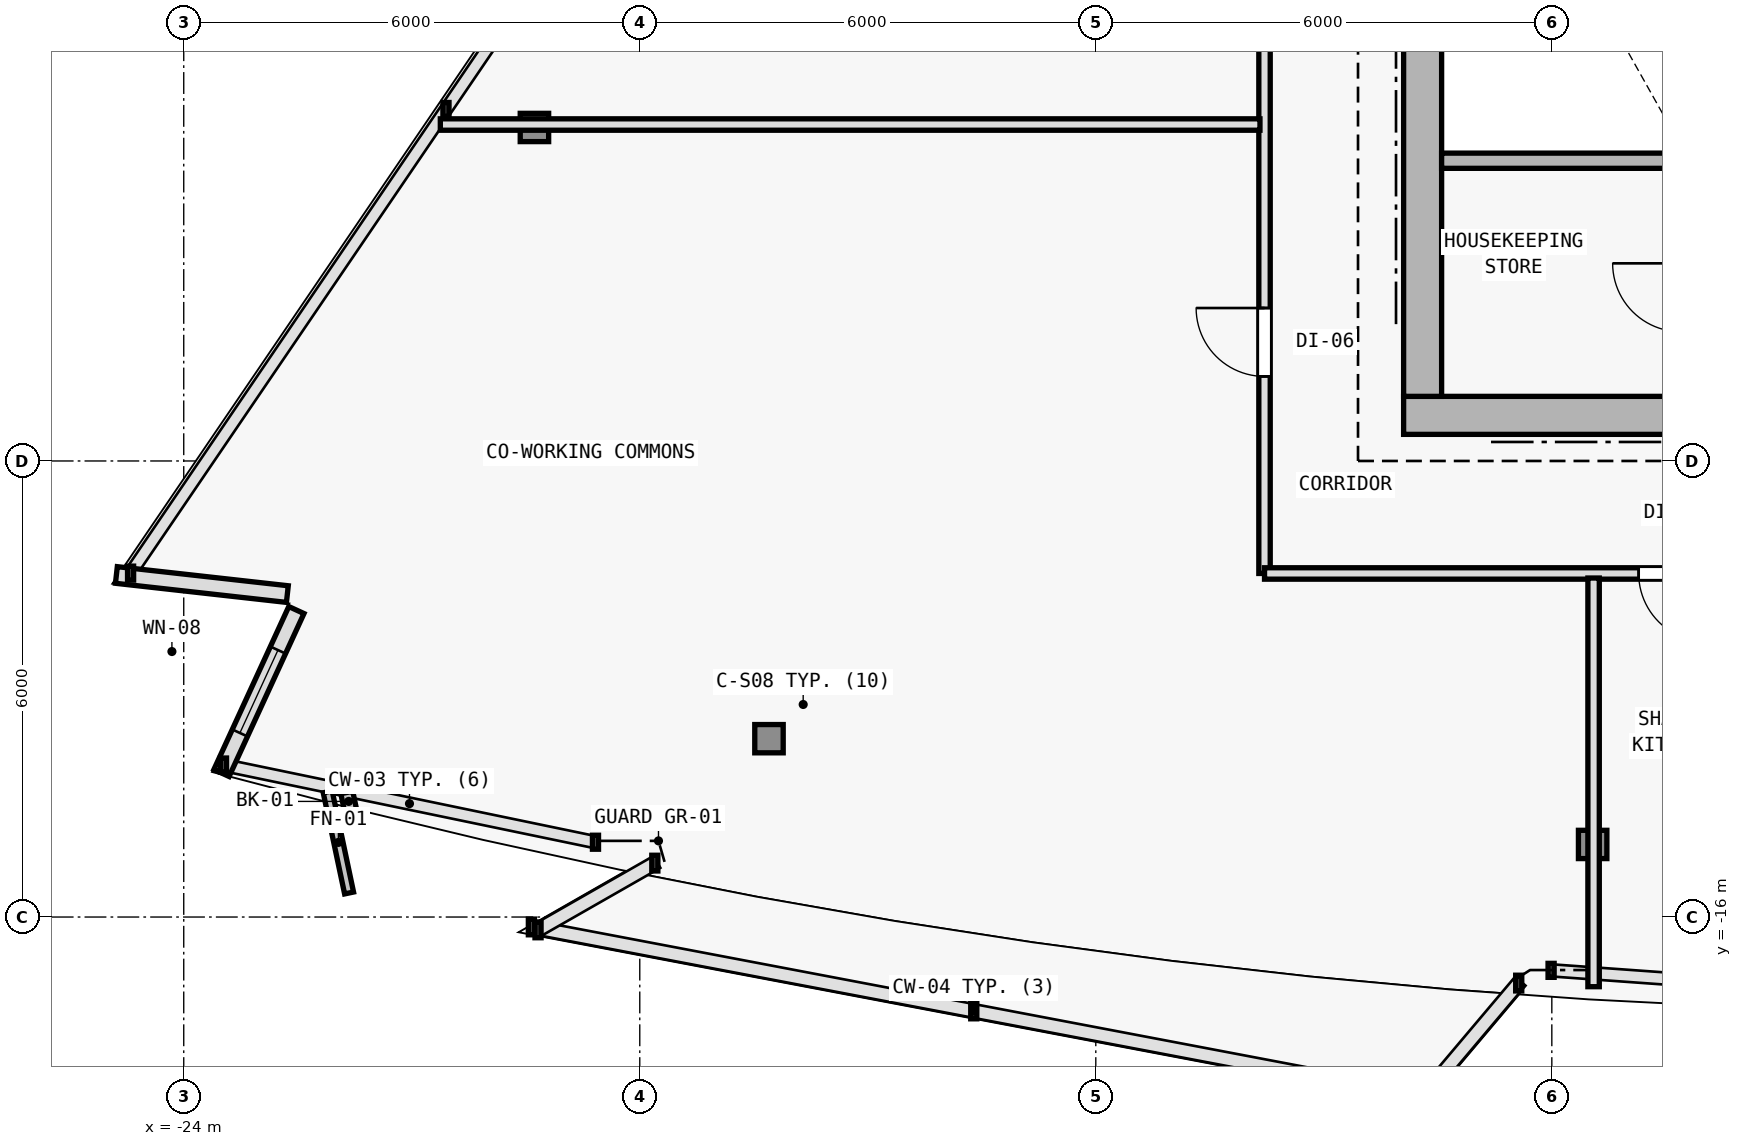
"""IFC4 building model, lengths in metres.
Left out: names, types, materials, properties, quantities, classifications, styles, units other than length and angle.
Written with IfcOpenShell. Run it as: python <this file> out.ifc"""

import sys

from ifc_helpers import new_model, si_unit, direction, frame, frame_2d, origin, origin_2d, place, context, subcontext, project, spatial, rectangle, i_section, extrude, element, fill, save


model = new_model("IFC4")
c1 = context("Model", 3, precision=1e-05, world=origin(), true_north=direction((0.0, 1.0)))
c2 = subcontext(c1, "Body", "Model", "MODEL_VIEW")
j1 = project(units=[si_unit("LENGTHUNIT", "METRE"), si_unit("PLANEANGLEUNIT", "RADIAN")], contexts=[c1])
p1 = place(None, origin())
s1 = spatial("IfcSite", under=j1, at=p1, CompositionType="ELEMENT")
p2 = place(p1, origin())
s2 = spatial("IfcBuilding", under=s1, at=p2, CompositionType="ELEMENT")
p3 = place(p2, frame((0.0, 0.0, 230.7)))
s3 = spatial("IfcBuildingStorey", under=s2, at=p3, CompositionType="ELEMENT", Elevation=230.7)
p4 = place(p3, frame((-7.7, -9.4, 0.0), z_axis=(0.0, 0.0, 1.0), x_axis=(1.0, 0.0, 0.0)))
e1 = element("IfcColumn", 1, at=p4, inside=s3, PredefinedType="COLUMN", context=c2, shape_type="SweptSolid", body=[
    extrude(i_section(OverallWidth=0.398, OverallDepth=0.387, WebThickness=0.013, FlangeThickness=0.022, FilletRadius=0.015, at=origin_2d()), origin(), (0.0, 0.0, 1.0), 3.6),
])
p5 = place(p3, frame((-16.3, -13.654, 0.006), z_axis=(0.020596292833, 0.033511459955, 0.999226087917), x_axis=(-0.851954850327, 0.523615252838, 0.0)))
e2 = element("IfcColumn", 2, at=p5, inside=s3, PredefinedType="COLUMN", context=c2, shape_type="SweptSolid", body=[
    extrude(i_section(OverallWidth=0.374, OverallDepth=0.372, WebThickness=0.012, FlangeThickness=0.02, FilletRadius=0.015, at=origin_2d()), origin(), (0.0, 0.0, 1.0), 3.592),
])
p6 = place(p3, frame((-5.463, -15.045, 0.006), z_axis=(0.006934288159, 0.035283289748, 0.999353293441), x_axis=(-0.981229659911, 0.192842823335, 0.0)))
e3 = element("IfcColumn", 3, at=p6, inside=s3, PredefinedType="COLUMN", context=c2, shape_type="SweptSolid", body=[
    extrude(i_section(OverallWidth=0.374, OverallDepth=0.372, WebThickness=0.012, FlangeThickness=0.02, FilletRadius=0.015, at=origin_2d()), origin(), (0.0, 0.0, 1.0), 3.591),
])
p7 = place(p3, frame((-19.386, -5.613, 0.006), z_axis=(0.025224163578, 0.021620711639, 0.999447990843), x_axis=(-0.650791373456, 0.759256602365, 0.0)))
e4 = element("IfcColumn", 4, at=p7, inside=s3, PredefinedType="COLUMN", context=c2, shape_type="SweptSolid", body=[
    extrude(i_section(OverallWidth=0.374, OverallDepth=0.372, WebThickness=0.012, FlangeThickness=0.02, FilletRadius=0.015, at=origin_2d()), origin(), (0.0, 0.0, 1.0), 3.591),
])
p8 = place(p3, frame((-22.637, -11.751, 0.0), z_axis=(0.0, 0.0, 1.0), x_axis=(-0.993821756753, 0.110987908368, 0.0)))
e5 = element("IfcWall", 5, at=p8, inside=s3, PredefinedType="SOLIDWALL", context=c2, shape_type="SweptSolid", body=[
    extrude(rectangle(XDim=2.263, YDim=0.22, at=frame_2d((1.132, 0.0))), origin(), (0.0, 0.0, 1.0), 3.35),
])
p9 = place(p3, frame((-23.503, -14.105, 0.0), z_axis=(0.0, 0.0, 1.0), x_axis=(0.417541737863, 0.908657744777, 0.0)))
e6 = element("IfcWall", 6, at=p9, inside=s3, PredefinedType="SOLIDWALL", context=c2, shape_type="SweptSolid", body=[
    extrude(rectangle(XDim=2.359, YDim=0.22, at=frame_2d((1.18, 0.0))), origin(), (0.0, 0.0, 1.0), 3.35),
])
p10 = place(p9, frame((0.58, 0.0, 0.62)))
e7 = element("IfcOpeningElement", 7, at=p10, cuts=e6, PredefinedType="OPENING", context=c2, shape_type="SweptSolid", body=[
    extrude(rectangle(XDim=1.2, YDim=1.8, at=frame_2d((0.6, 0.9))), frame((0.0, 0.12, 0.0), z_axis=(0.0, -1.0, 0.0), x_axis=(1.0, 0.0, 0.0)), (0.0, 0.0, 1.0), 0.24),
])
p11 = place(p3, frame((-7.95, -9.4, 0.0), z_axis=(0.0, 0.0, 1.0), x_axis=(1.0, 0.0, 0.0)))
e8 = element("IfcWall", 8, at=p11, inside=s3, PredefinedType="SHEAR", context=c2, shape_type="SweptSolid", body=[
    extrude(rectangle(XDim=15.9, YDim=0.5, at=frame_2d((7.95, 0.0))), origin(), (0.0, 0.0, 1.0), 3.35),
])
p12 = place(p11, frame((9.6, 0.0, 0.0)))
e9 = element("IfcOpeningElement", 9, at=p12, cuts=e8, PredefinedType="OPENING", context=c2, shape_type="SweptSolid", body=[
    extrude(rectangle(XDim=1.5, YDim=2.2, at=frame_2d((0.75, 1.1))), frame((0.0, 0.26, 0.0), z_axis=(0.0, -1.0, 0.0), x_axis=(1.0, 0.0, 0.0)), (0.0, 0.0, 1.0), 0.52),
])
p13 = place(p3, frame((-7.7, -9.15, 0.0), z_axis=(0.0, 0.0, 1.0), x_axis=(0.0, 1.0, 0.0)))
e10 = element("IfcWall", 10, at=p13, inside=s3, PredefinedType="SHEAR", context=c2, shape_type="SweptSolid", body=[
    extrude(rectangle(XDim=19.1, YDim=0.5, at=frame_2d((9.55, 0.0))), origin(), (0.0, 0.0, 1.0), 3.35),
])
p14 = place(p13, frame((12.7, 0.0, 0.0)))
e11 = element("IfcOpeningElement", 11, at=p14, cuts=e10, PredefinedType="OPENING", context=c2, shape_type="SweptSolid", body=[
    extrude(rectangle(XDim=1.1, YDim=2.15, at=frame_2d((0.55, 1.075))), frame((0.0, 0.26, 0.0), z_axis=(0.0, -1.0, 0.0), x_axis=(1.0, 0.0, 0.0)), (0.0, 0.0, 1.0), 0.52),
])
p15 = place(p3, frame((-7.45, -6.05, 0.0), z_axis=(0.0, 0.0, 1.0), x_axis=(1.0, 0.0, 0.0)))
e12 = element("IfcWall", 12, at=p15, inside=s3, PredefinedType="SOLIDWALL", context=c2, shape_type="SweptSolid", body=[
    extrude(rectangle(XDim=3.4, YDim=0.2, at=frame_2d((1.7, 0.0))), origin(), (0.0, 0.0, 1.0), 3.35),
])
p16 = place(p3, frame((-9.78, -11.48, 0.0), z_axis=(0.0, 0.0, 1.0), x_axis=(0.0, 1.0, 0.0)))
e13 = element("IfcWall", 13, at=p16, inside=s3, PredefinedType="PARTITIONING", context=c2, shape_type="SweptSolid", body=[
    extrude(rectangle(XDim=19.706, YDim=0.15, at=frame_2d((9.853, 0.0))), origin(), (0.0, 0.0, 1.0), 2.725),
])
p17 = place(p16, frame((2.592, 0.0, 0.0)))
e14 = element("IfcOpeningElement", 14, at=p17, cuts=e13, PredefinedType="OPENING", context=c2, shape_type="SweptSolid", body=[
    extrude(rectangle(XDim=0.9, YDim=2.1, at=frame_2d((0.45, 1.05))), frame((0.0, 0.085, 0.0), z_axis=(0.0, -1.0, 0.0), x_axis=(1.0, 0.0, 0.0)), (0.0, 0.0, 1.0), 0.17),
])
p18 = place(p16, frame((12.267, 0.0, 0.0)))
e15 = element("IfcOpeningElement", 15, at=p18, cuts=e13, PredefinedType="OPENING", context=c2, shape_type="SweptSolid", body=[
    extrude(rectangle(XDim=0.9, YDim=2.1, at=frame_2d((0.45, 1.05))), frame((0.0, 0.085, 0.0), z_axis=(0.0, -1.0, 0.0), x_axis=(1.0, 0.0, 0.0)), (0.0, 0.0, 1.0), 0.17),
])
p19 = place(p3, frame((9.78, -11.48, 0.0), z_axis=(0.0, 0.0, 1.0), x_axis=(-1.0, 0.0, 0.0)))
e16 = element("IfcWall", 16, at=p19, inside=s3, PredefinedType="PARTITIONING", context=c2, shape_type="SweptSolid", body=[
    extrude(rectangle(XDim=19.56, YDim=0.15, at=frame_2d((9.78, 0.0))), origin(), (0.0, 0.0, 1.0), 3.005),
])
p20 = place(p19, frame((13.737, 0.0, 0.0)))
e17 = element("IfcOpeningElement", 17, at=p20, cuts=e16, PredefinedType="OPENING", context=c2, shape_type="SweptSolid", body=[
    extrude(rectangle(XDim=0.9, YDim=2.1, at=frame_2d((0.45, 1.05))), frame((0.0, 0.085, 0.0), z_axis=(0.0, -1.0, 0.0), x_axis=(1.0, 0.0, 0.0)), (0.0, 0.0, 1.0), 0.17),
])
p21 = place(p19, frame((11.786, 0.0, 0.0)))
e18 = element("IfcOpeningElement", 18, at=p21, cuts=e16, PredefinedType="OPENING", context=c2, shape_type="SweptSolid", body=[
    extrude(rectangle(XDim=0.85, YDim=2.1, at=frame_2d((0.425, 1.05))), frame((0.0, 0.085, 0.0), z_axis=(0.0, -1.0, 0.0), x_axis=(1.0, 0.0, 0.0)), (0.0, 0.0, 1.0), 0.17),
])
p22 = place(p19, frame((9.711, 0.0, 0.0)))
e19 = element("IfcOpeningElement", 19, at=p22, cuts=e16, PredefinedType="OPENING", context=c2, shape_type="SweptSolid", body=[
    extrude(rectangle(XDim=0.9, YDim=2.1, at=frame_2d((0.45, 1.05))), frame((0.0, 0.085, 0.0), z_axis=(0.0, -1.0, 0.0), x_axis=(1.0, 0.0, 0.0)), (0.0, 0.0, 1.0), 0.17),
])
p23 = place(p19, frame((7.476, 0.0, 0.0)))
e20 = element("IfcOpeningElement", 20, at=p23, cuts=e16, PredefinedType="OPENING", context=c2, shape_type="SweptSolid", body=[
    extrude(rectangle(XDim=0.9, YDim=2.1, at=frame_2d((0.45, 1.05))), frame((0.0, 0.085, 0.0), z_axis=(0.0, -1.0, 0.0), x_axis=(1.0, 0.0, 0.0)), (0.0, 0.0, 1.0), 0.17),
])
p24 = place(p19, frame((5.143, 0.0, 0.0)))
e21 = element("IfcOpeningElement", 21, at=p24, cuts=e16, PredefinedType="OPENING", context=c2, shape_type="SweptSolid", body=[
    extrude(rectangle(XDim=0.9, YDim=2.1, at=frame_2d((0.45, 1.05))), frame((0.0, 0.085, 0.0), z_axis=(0.0, -1.0, 0.0), x_axis=(1.0, 0.0, 0.0)), (0.0, 0.0, 1.0), 0.17),
])
p25 = place(p19, frame((1.804, 0.0, 0.0)))
e22 = element("IfcOpeningElement", 22, at=p25, cuts=e16, PredefinedType="OPENING", context=c2, shape_type="SweptSolid", body=[
    extrude(rectangle(XDim=0.9, YDim=2.1, at=frame_2d((0.45, 1.05))), frame((0.0, 0.085, 0.0), z_axis=(0.0, -1.0, 0.0), x_axis=(1.0, 0.0, 0.0)), (0.0, 0.0, 1.0), 0.17),
])
p26 = place(p3, frame((-5.45, -11.54, 0.0), z_axis=(0.0, 0.0, 1.0), x_axis=(0.0, -1.0, 0.0)))
e23 = element("IfcWall", 23, at=p26, inside=s3, PredefinedType="PARTITIONING", context=c2, shape_type="SweptSolid", body=[
    extrude(rectangle(XDim=5.376, YDim=0.15, at=frame_2d((2.688, 0.0))), origin(), (0.0, 0.0, 1.0), 2.775),
])
p27 = place(p3, frame((-9.84, -5.574, 0.0), z_axis=(0.0, 0.0, 1.0), x_axis=(-1.0, 0.0, 0.0)))
e24 = element("IfcWall", 24, at=p27, inside=s3, PredefinedType="PARTITIONING", context=c2, shape_type="SweptSolid", body=[
    extrude(rectangle(XDim=10.784, YDim=0.15, at=frame_2d((5.392, 0.0))), origin(), (0.0, 0.0, 1.0), 2.725),
])
p28 = place(p10, origin())
e25 = element("IfcWindow", 25, at=p28, inside=s3, PartitioningType="SINGLE_PANEL", PredefinedType="WINDOW", context=c2, shape_type="SweptSolid", body=[
    extrude(rectangle(XDim=1.2, YDim=1.8, at=frame_2d((0.6, 0.9))), frame((0.0, 0.03, 0.0), z_axis=(0.0, -1.0, 0.0), x_axis=(1.0, 0.0, 0.0)), (0.0, 0.0, 1.0), 0.06),
])
fill(e7, e25)
p29 = place(p17, origin())
e26 = element("IfcDoor", 26, at=p29, inside=s3, OperationType="SINGLE_SWING_RIGHT", PredefinedType="DOOR", context=c2, shape_type="SweptSolid", body=[
    extrude(rectangle(XDim=0.9, YDim=2.1, at=frame_2d((0.45, 1.05))), frame((0.0, 0.025, 0.0), z_axis=(0.0, -1.0, 0.0), x_axis=(1.0, 0.0, 0.0)), (0.0, 0.0, 1.0), 0.05),
])
fill(e14, e26)
p30 = place(p20, origin())
e27 = element("IfcDoor", 27, at=p30, inside=s3, OperationType="SINGLE_SWING_LEFT", PredefinedType="DOOR", context=c2, shape_type="SweptSolid", body=[
    extrude(rectangle(XDim=0.9, YDim=2.1, at=frame_2d((0.45, 1.05))), frame((0.0, 0.025, 0.0), z_axis=(0.0, -1.0, 0.0), x_axis=(1.0, 0.0, 0.0)), (0.0, 0.0, 1.0), 0.05),
])
fill(e17, e27)
save(model, sys.argv[1])
